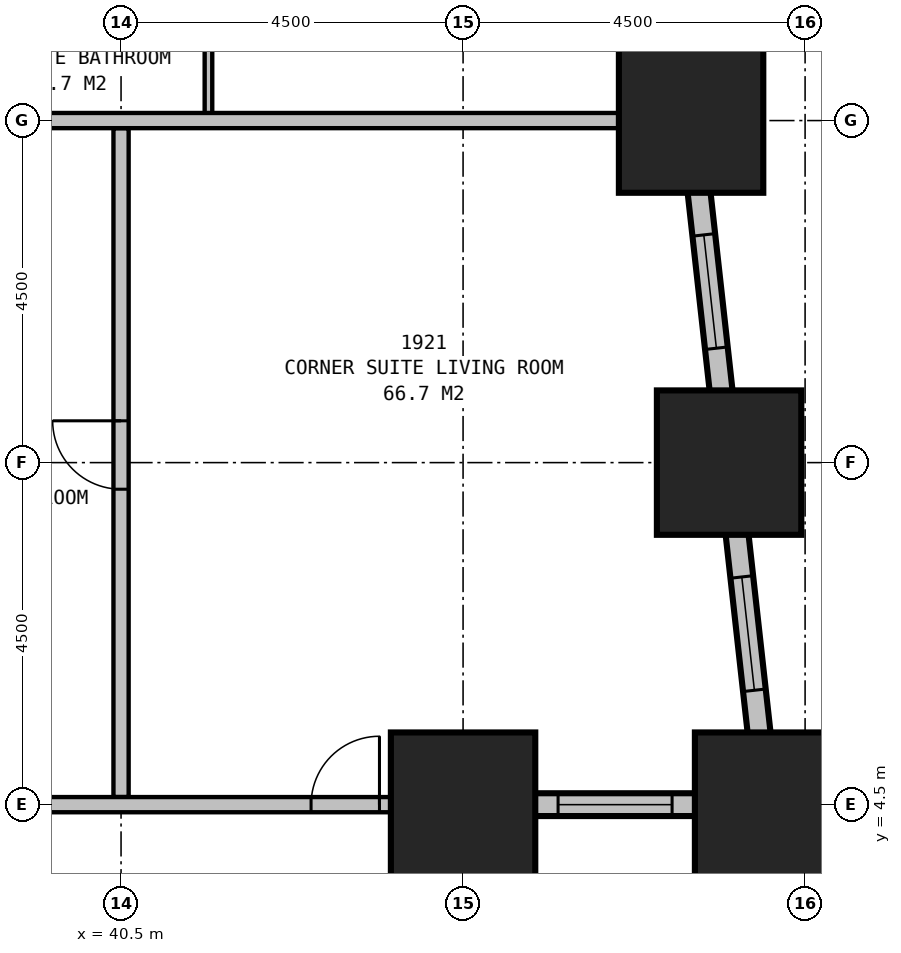
"""IFC4 building model, lengths in metres.
Left out: names, types, materials, properties, quantities, classifications, styles, units other than length and angle.
Written with IfcOpenShell. Run it as: python <this file> out.ifc"""

import sys

from ifc_helpers import new_model, si_unit, direction, frame, frame_2d, origin, origin_2d, place, context, subcontext, project, spatial, rectangle, extrude, element, fill, save


model = new_model("IFC4")
c1 = context("Model", 3, precision=1e-05, world=origin(), true_north=direction((0.0, 1.0)))
c2 = subcontext(c1, "Body", "Model", "MODEL_VIEW")
j1 = project(units=[si_unit("LENGTHUNIT", "METRE"), si_unit("PLANEANGLEUNIT", "RADIAN")], contexts=[c1])
p1 = place(None, origin())
s1 = spatial("IfcSite", under=j1, at=p1, CompositionType="ELEMENT")
p2 = place(p1, origin())
s2 = spatial("IfcBuilding", under=s1, at=p2, CompositionType="ELEMENT")
p3 = place(p2, frame((0.0, 0.0, 78.7)))
s3 = spatial("IfcBuildingStorey", under=s2, at=p3, CompositionType="ELEMENT", Elevation=78.7)
for number, where, z_axis, x_axis in (
    (1, (45.0, 4.5, 0.0), (0.0, 0.0, 1.0), (1.0, 0.0, 0.0)),
    (2, (49.0, 4.5, 0.0), (0.0, 0.0, 1.0), (1.0, 0.0, 0.0)),
    (3, (48.5, 9.0, 0.0), (0.0, 0.0, 1.0), (1.0, 0.0, 0.0)),
    (4, (48.0, 13.5, 0.0), (0.0, 0.0, 1.0), (1.0, 0.0, 0.0)),
):
    element("IfcColumn", number, at=place(p3, frame(where, z_axis=z_axis, x_axis=x_axis)), inside=s3, PredefinedType="COLUMN", context=c2, shape_type="SweptSolid", body=[
        extrude(rectangle(XDim=1.9, YDim=1.9, at=origin_2d()), origin(), (0.0, 0.0, 1.0), 3.5),
    ])
p4 = place(p3, frame((45.0, -0.15, 0.0), z_axis=(0.0, 0.0, 1.0), x_axis=(0.0, 1.0, 0.0)))
e5 = element("IfcWall", 5, at=p4, inside=s3, PredefinedType="STANDARD", context=c2, shape_type="SweptSolid", body=[
    extrude(rectangle(XDim=4.8, YDim=0.3, at=frame_2d((2.4, 0.0))), origin(), (0.0, 0.0, 1.0), 2.05),
])
p5 = place(p4, frame((1.65, 0.0, 0.5)))
e6 = element("IfcOpeningElement", 6, at=p5, cuts=e5, PredefinedType="OPENING", context=c2, shape_type="SweptSolid", body=[
    extrude(rectangle(XDim=1.5, YDim=1.4, at=frame_2d((0.75, 0.7))), frame((0.0, 0.16, 0.0), z_axis=(0.0, -1.0, 0.0), x_axis=(1.0, 0.0, 0.0)), (0.0, 0.0, 1.0), 0.32),
])
p6 = place(p3, frame((44.85, 4.5, 0.0), z_axis=(0.0, 0.0, 1.0), x_axis=(1.0, 0.0, 0.0)))
e7 = element("IfcWall", 7, at=p6, inside=s3, PredefinedType="STANDARD", context=c2, shape_type="SweptSolid", body=[
    extrude(rectangle(XDim=4.3, YDim=0.3, at=frame_2d((2.15, 0.0))), origin(), (0.0, 0.0, 1.0), 2.05),
])
p7 = place(p6, frame((1.4, 0.0, 0.5)))
e8 = element("IfcOpeningElement", 8, at=p7, cuts=e7, PredefinedType="OPENING", context=c2, shape_type="SweptSolid", body=[
    extrude(rectangle(XDim=1.5, YDim=1.4, at=frame_2d((0.75, 0.7))), frame((0.0, 0.16, 0.0), z_axis=(0.0, -1.0, 0.0), x_axis=(1.0, 0.0, 0.0)), (0.0, 0.0, 1.0), 0.32),
])
p8 = place(p3, frame((49.017, 4.351, 0.0), z_axis=(0.0, 0.0, 1.0), x_axis=(-0.110433201132, 0.993883548555, 0.0)))
e9 = element("IfcWall", 9, at=p8, inside=s3, PredefinedType="STANDARD", context=c2, shape_type="SweptSolid", body=[
    extrude(rectangle(XDim=31.994, YDim=0.3, at=frame_2d((15.997, 0.0))), origin(), (0.0, 0.0, 1.0), 2.05),
])
p9 = place(p8, frame((1.664, 0.0, 0.5)))
e10 = element("IfcOpeningElement", 10, at=p9, cuts=e9, PredefinedType="OPENING", context=c2, shape_type="SweptSolid", body=[
    extrude(rectangle(XDim=1.5, YDim=1.4, at=frame_2d((0.75, 0.7))), frame((0.0, 0.16, 0.0), z_axis=(0.0, -1.0, 0.0), x_axis=(1.0, 0.0, 0.0)), (0.0, 0.0, 1.0), 0.32),
])
p10 = place(p8, frame((6.192, 0.0, 0.5)))
e11 = element("IfcOpeningElement", 11, at=p10, cuts=e9, PredefinedType="OPENING", context=c2, shape_type="SweptSolid", body=[
    extrude(rectangle(XDim=1.5, YDim=1.4, at=frame_2d((0.75, 0.7))), frame((0.0, 0.16, 0.0), z_axis=(0.0, -1.0, 0.0), x_axis=(1.0, 0.0, 0.0)), (0.0, 0.0, 1.0), 0.32),
])
p11 = place(p8, frame((10.719, 0.0, 0.5)))
e12 = element("IfcOpeningElement", 12, at=p11, cuts=e9, PredefinedType="OPENING", context=c2, shape_type="SweptSolid", body=[
    extrude(rectangle(XDim=1.5, YDim=1.4, at=frame_2d((0.75, 0.7))), frame((0.0, 0.16, 0.0), z_axis=(0.0, -1.0, 0.0), x_axis=(1.0, 0.0, 0.0)), (0.0, 0.0, 1.0), 0.32),
])
p12 = place(p8, frame((15.247, 0.0, 0.5)))
e13 = element("IfcOpeningElement", 13, at=p12, cuts=e9, PredefinedType="OPENING", context=c2, shape_type="SweptSolid", body=[
    extrude(rectangle(XDim=1.5, YDim=1.4, at=frame_2d((0.75, 0.7))), frame((0.0, 0.16, 0.0), z_axis=(0.0, -1.0, 0.0), x_axis=(1.0, 0.0, 0.0)), (0.0, 0.0, 1.0), 0.32),
])
p13 = place(p8, frame((19.775, 0.0, 0.5)))
e14 = element("IfcOpeningElement", 14, at=p13, cuts=e9, PredefinedType="OPENING", context=c2, shape_type="SweptSolid", body=[
    extrude(rectangle(XDim=1.5, YDim=1.4, at=frame_2d((0.75, 0.7))), frame((0.0, 0.16, 0.0), z_axis=(0.0, -1.0, 0.0), x_axis=(1.0, 0.0, 0.0)), (0.0, 0.0, 1.0), 0.32),
])
p14 = place(p8, frame((24.302, 0.0, 0.5)))
e15 = element("IfcOpeningElement", 15, at=p14, cuts=e9, PredefinedType="OPENING", context=c2, shape_type="SweptSolid", body=[
    extrude(rectangle(XDim=1.5, YDim=1.4, at=frame_2d((0.75, 0.7))), frame((0.0, 0.16, 0.0), z_axis=(0.0, -1.0, 0.0), x_axis=(1.0, 0.0, 0.0)), (0.0, 0.0, 1.0), 0.32),
])
p15 = place(p8, frame((28.83, 0.0, 0.5)))
e16 = element("IfcOpeningElement", 16, at=p15, cuts=e9, PredefinedType="OPENING", context=c2, shape_type="SweptSolid", body=[
    extrude(rectangle(XDim=1.5, YDim=1.4, at=frame_2d((0.75, 0.7))), frame((0.0, 0.16, 0.0), z_axis=(0.0, -1.0, 0.0), x_axis=(1.0, 0.0, 0.0)), (0.0, 0.0, 1.0), 0.32),
])
p16 = place(p3, frame((41.65, 13.5, 0.0), z_axis=(0.0, 0.0, 1.0), x_axis=(0.0, 1.0, 0.0)))
e17 = element("IfcWall", 17, at=p16, inside=s3, PredefinedType="PLUMBINGWALL", context=c2, shape_type="SweptSolid", body=[
    extrude(rectangle(XDim=2.6, YDim=0.1, at=frame_2d((1.3, 0.0))), origin(), (0.0, 0.0, 1.0), 3.25),
])
p17 = place(p3, frame((38.3, 13.5, 0.0), z_axis=(0.0, 0.0, 1.0), x_axis=(1.0, 0.0, 0.0)))
e18 = element("IfcWall", 18, at=p17, inside=s3, PredefinedType="PARTITIONING", context=c2, shape_type="SweptSolid", body=[
    extrude(rectangle(XDim=9.921, YDim=0.2, at=frame_2d((4.96, 0.0))), origin(), (0.0, 0.0, 1.0), 1.95),
])
p18 = place(p3, frame((35.9, 4.5, 0.0), z_axis=(0.0, 0.0, 1.0), x_axis=(1.0, 0.0, 0.0)))
e19 = element("IfcWall", 19, at=p18, inside=s3, PredefinedType="PARTITIONING", context=c2, shape_type="SweptSolid", body=[
    extrude(rectangle(XDim=9.1, YDim=0.2, at=frame_2d((4.55, 0.0))), origin(), (0.0, 0.0, 1.0), 3.25),
])
p19 = place(p18, frame((7.1, 0.0, 0.0)))
e20 = element("IfcOpeningElement", 20, at=p19, cuts=e19, PredefinedType="OPENING", context=c2, shape_type="SweptSolid", body=[
    extrude(rectangle(XDim=0.9, YDim=2.1, at=frame_2d((0.45, 1.05))), frame((0.0, 0.11, 0.0), z_axis=(0.0, -1.0, 0.0), x_axis=(1.0, 0.0, 0.0)), (0.0, 0.0, 1.0), 0.22),
])
p20 = place(p3, frame((40.5, 4.6, 0.0), z_axis=(0.0, 0.0, 1.0), x_axis=(0.0, 1.0, 0.0)))
e21 = element("IfcWall", 21, at=p20, inside=s3, PredefinedType="PARTITIONING", context=c2, shape_type="SweptSolid", body=[
    extrude(rectangle(XDim=8.8, YDim=0.2, at=frame_2d((4.4, 0.0))), origin(), (0.0, 0.0, 1.0), 2.25),
])
p21 = place(p20, frame((4.05, 0.0, 0.0)))
e22 = element("IfcOpeningElement", 22, at=p21, cuts=e21, PredefinedType="OPENING", context=c2, shape_type="SweptSolid", body=[
    extrude(rectangle(XDim=0.9, YDim=2.1, at=frame_2d((0.45, 1.05))), frame((0.0, 0.11, 0.0), z_axis=(0.0, -1.0, 0.0), x_axis=(1.0, 0.0, 0.0)), (0.0, 0.0, 1.0), 0.22),
])
p22 = place(p7, origin())
e23 = element("IfcWindow", 23, at=p22, inside=s3, PartitioningType="SINGLE_PANEL", PredefinedType="WINDOW", context=c2, shape_type="SweptSolid", body=[
    extrude(rectangle(XDim=1.5, YDim=1.4, at=frame_2d((0.75, 0.7))), frame((0.0, 0.03, 0.0), z_axis=(0.0, -1.0, 0.0), x_axis=(1.0, 0.0, 0.0)), (0.0, 0.0, 1.0), 0.06),
])
fill(e8, e23)
p23 = place(p9, origin())
e24 = element("IfcWindow", 24, at=p23, inside=s3, PartitioningType="SINGLE_PANEL", PredefinedType="WINDOW", context=c2, shape_type="SweptSolid", body=[
    extrude(rectangle(XDim=1.5, YDim=1.4, at=frame_2d((0.75, 0.7))), frame((0.0, 0.03, 0.0), z_axis=(0.0, -1.0, 0.0), x_axis=(1.0, 0.0, 0.0)), (0.0, 0.0, 1.0), 0.06),
])
fill(e10, e24)
p24 = place(p10, origin())
e25 = element("IfcWindow", 25, at=p24, inside=s3, PartitioningType="SINGLE_PANEL", PredefinedType="WINDOW", context=c2, shape_type="SweptSolid", body=[
    extrude(rectangle(XDim=1.5, YDim=1.4, at=frame_2d((0.75, 0.7))), frame((0.0, 0.03, 0.0), z_axis=(0.0, -1.0, 0.0), x_axis=(1.0, 0.0, 0.0)), (0.0, 0.0, 1.0), 0.06),
])
fill(e11, e25)
p25 = place(p19, origin())
e26 = element("IfcDoor", 26, at=p25, inside=s3, OperationType="SINGLE_SWING_RIGHT", PredefinedType="DOOR", context=c2, shape_type="SweptSolid", body=[
    extrude(rectangle(XDim=0.9, YDim=2.1, at=frame_2d((0.45, 1.05))), frame((0.0, 0.025, 0.0), z_axis=(0.0, -1.0, 0.0), x_axis=(1.0, 0.0, 0.0)), (0.0, 0.0, 1.0), 0.05),
])
fill(e20, e26)
p26 = place(p21, origin())
e27 = element("IfcDoor", 27, at=p26, inside=s3, OperationType="SINGLE_SWING_RIGHT", PredefinedType="DOOR", context=c2, shape_type="SweptSolid", body=[
    extrude(rectangle(XDim=0.9, YDim=2.1, at=frame_2d((0.45, 1.05))), frame((0.0, 0.025, 0.0), z_axis=(0.0, -1.0, 0.0), x_axis=(1.0, 0.0, 0.0)), (0.0, 0.0, 1.0), 0.05),
])
fill(e22, e27)
save(model, sys.argv[1])
